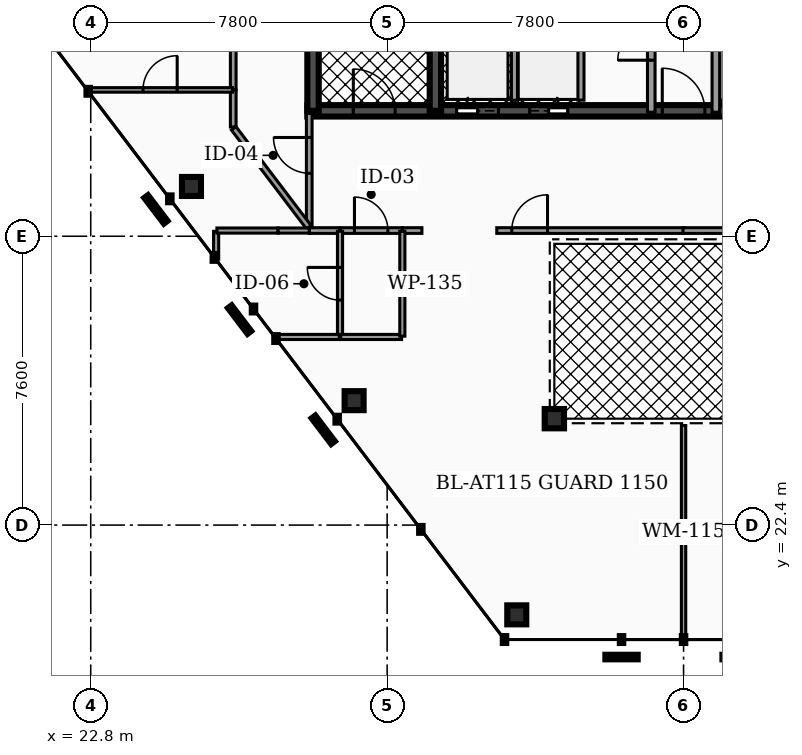
"""IFC4 building model, lengths in metres.
Left out: names, types, materials, properties, quantities, classifications, styles, units other than length and angle.
Written with IfcOpenShell. Run it as: python <this file> out.ifc"""

import sys

from ifc_helpers import new_model, si_unit, direction, frame, frame_2d, origin, origin_2d, place, context, subcontext, project, spatial, rectangle, hollow_rectangle, hollow_circle, extrude, element, fill, save


model = new_model("IFC4")
c1 = context("Model", 3, precision=1e-05, world=origin(), true_north=direction((0.0, 1.0)))
c2 = subcontext(c1, "Body", "Model", "MODEL_VIEW")
j1 = project(units=[si_unit("LENGTHUNIT", "METRE"), si_unit("PLANEANGLEUNIT", "RADIAN")], contexts=[c1])
p1 = place(None, origin())
s1 = spatial("IfcSite", under=j1, at=p1, CompositionType="ELEMENT")
p2 = place(p1, origin())
s2 = spatial("IfcBuilding", under=s1, at=p2, CompositionType="ELEMENT")
p3 = place(p2, frame((0.0, 0.0, 272.0)))
s3 = spatial("IfcBuildingStorey", under=s2, at=p3, CompositionType="ELEMENT", Elevation=272.0)
p4 = place(p3, frame((28.5, 33.3, 0.0), z_axis=(0.0, 0.0, 1.0), x_axis=(1.0, 0.0, 0.0)))
e1 = element("IfcWall", 1, at=p4, inside=s3, PredefinedType="SHEAR", context=c2, shape_type="SweptSolid", body=[
    extrude(rectangle(XDim=19.86, YDim=0.3, at=frame_2d((9.93, 0.0))), origin(), (0.0, 0.0, 1.0), 3.18),
])
p5 = place(p4, frame((3.93, 0.0, 0.0)))
e2 = element("IfcOpeningElement", 2, at=p5, cuts=e1, PredefinedType="OPENING", context=c2, shape_type="SweptSolid", body=[
    extrude(rectangle(XDim=1.1, YDim=2.15, at=frame_2d((0.55, 1.075))), frame((0.0, 0.16, 0.0), z_axis=(0.0, -1.0, 0.0), x_axis=(1.0, 0.0, 0.0)), (0.0, 0.0, 1.0), 0.32),
])
p6 = place(p4, frame((14.77, 0.0, 0.0)))
e3 = element("IfcOpeningElement", 3, at=p6, cuts=e1, PredefinedType="OPENING", context=c2, shape_type="SweptSolid", body=[
    extrude(rectangle(XDim=1.1, YDim=2.15, at=frame_2d((0.55, 1.075))), frame((0.0, 0.16, 0.0), z_axis=(0.0, -1.0, 0.0), x_axis=(1.0, 0.0, 0.0)), (0.0, 0.0, 1.0), 0.32),
])
p7 = place(p4, frame((11.25, 0.0, 0.0)))
e4 = element("IfcOpeningElement", 4, at=p7, cuts=e1, PredefinedType="OPENING", context=c2, shape_type="SweptSolid", body=[
    extrude(rectangle(XDim=1.0, YDim=2.1, at=frame_2d((0.5, 1.05))), frame((0.0, 0.16, 0.0), z_axis=(0.0, -1.0, 0.0), x_axis=(1.0, 0.0, 0.0)), (0.0, 0.0, 1.0), 0.32),
])
p8 = place(p4, frame((12.95, 0.0, 0.0)))
e5 = element("IfcOpeningElement", 5, at=p8, cuts=e1, PredefinedType="OPENING", context=c2, shape_type="SweptSolid", body=[
    extrude(rectangle(XDim=1.0, YDim=2.1, at=frame_2d((0.5, 1.05))), frame((0.0, 0.16, 0.0), z_axis=(0.0, -1.0, 0.0), x_axis=(1.0, 0.0, 0.0)), (0.0, 0.0, 1.0), 0.32),
])
p9 = place(p4, frame((5.85, 0.0, 0.0)))
e6 = element("IfcOpeningElement", 6, at=p9, cuts=e1, PredefinedType="OPENING", context=c2, shape_type="SweptSolid", body=[
    extrude(rectangle(XDim=1.0, YDim=2.1, at=frame_2d((0.5, 1.05))), frame((0.0, 0.16, 0.0), z_axis=(0.0, -1.0, 0.0), x_axis=(1.0, 0.0, 0.0)), (0.0, 0.0, 1.0), 0.32),
])
p10 = place(p4, frame((1.21, 0.0, 0.0)))
e7 = element("IfcOpeningElement", 7, at=p10, cuts=e1, PredefinedType="OPENING", context=c2, shape_type="SweptSolid", body=[
    extrude(rectangle(XDim=1.1, YDim=2.2, at=frame_2d((0.55, 1.1))), frame((0.0, 0.16, 0.0), z_axis=(0.0, -1.0, 0.0), x_axis=(1.0, 0.0, 0.0)), (0.0, 0.0, 1.0), 0.32),
])
p11 = place(p4, frame((9.34, 0.0, 0.0)))
e8 = element("IfcOpeningElement", 8, at=p11, cuts=e1, PredefinedType="OPENING", context=c2, shape_type="SweptSolid", body=[
    extrude(rectangle(XDim=1.12, YDim=2.05, at=frame_2d((0.56, 1.025))), frame((0.0, 0.16, 0.0), z_axis=(0.0, -1.0, 0.0), x_axis=(1.0, 0.0, 0.0)), (0.0, 0.0, 1.0), 0.32),
])
p12 = place(p4, frame((17.55, 0.0, 0.0)))
e9 = element("IfcOpeningElement", 9, at=p12, cuts=e1, PredefinedType="OPENING", context=c2, shape_type="SweptSolid", body=[
    extrude(rectangle(XDim=1.1, YDim=2.2, at=frame_2d((0.55, 1.1))), frame((0.0, 0.16, 0.0), z_axis=(0.0, -1.0, 0.0), x_axis=(1.0, 0.0, 0.0)), (0.0, 0.0, 1.0), 0.32),
])
for number, where, z_axis, x_axis in (
    (10, (28.65, 33.3, 0.0), (0.0, 0.0, 1.0), (0.0, 1.0, 0.0)),
    (11, (31.87, 33.3, 0.0), (0.0, 0.0, 1.0), (0.0, 1.0, 0.0)),
):
    element("IfcWall", number, at=place(p3, frame(where, z_axis=z_axis, x_axis=x_axis)), inside=s3, PredefinedType="SHEAR", context=c2, shape_type="SweptSolid", body=[
        extrude(rectangle(XDim=10.1, YDim=0.3, at=frame_2d((5.05, 0.0))), origin(), (0.0, 0.0, 1.0), 3.18),
    ])
for number, where, z_axis, x_axis in (
    (12, (25.451, 31.31, 0.0), (0.0, 0.0, 1.0), (1.0, 0.0, 0.0)),
    (13, (29.731, 25.674, 0.0), (0.0, 0.0, 1.0), (1.0, 0.0, 0.0)),
    (14, (34.011, 20.038, 0.0), (0.0, 0.0, 1.0), (1.0, 0.0, 0.0)),
):
    element("IfcColumn", number, at=place(p3, frame(where, z_axis=z_axis, x_axis=x_axis)), inside=s3, PredefinedType="COLUMN", context=c2, shape_type="SweptSolid", body=[
        extrude(hollow_rectangle(XDim=0.5, YDim=0.5, WallThickness=0.025, at=origin_2d()), origin(), (0.0, 0.0, 1.0), 3.18),
    ])
p13 = place(p3, frame((35.0, 25.2, 0.0), z_axis=(0.0, 0.0, 1.0), x_axis=(1.0, 0.0, 0.0)))
e15 = element("IfcColumn", 15, at=p13, inside=s3, PredefinedType="COLUMN", context=c2, shape_type="SweptSolid", body=[
    extrude(hollow_circle(Radius=0.254, WallThickness=0.02, at=origin_2d()), origin(), (0.0, 0.0, 1.0), 3.18),
])
p14 = place(p3, frame((33.95, 33.58, 0.0), z_axis=(0.0, 0.0, 1.0), x_axis=(0.0, 1.0, 0.0)))
e16 = element("IfcWall", 16, at=p14, inside=s3, PredefinedType="SOLIDWALL", context=c2, shape_type="SweptSolid", body=[
    extrude(rectangle(XDim=2.45, YDim=0.16, at=frame_2d((1.225, 0.0))), origin(), (0.0, 0.0, 1.0), 3.18),
])
for number, where, z_axis, x_axis in (
    (17, (39.4, 33.58, 0.0), (0.0, 0.0, 1.0), (0.0, 1.0, 0.0)),
    (18, (35.7, 33.58, 0.0), (0.0, 0.0, 1.0), (0.0, 1.0, 0.0)),
):
    element("IfcWall", number, at=place(p3, frame(where, z_axis=z_axis, x_axis=x_axis)), inside=s3, PredefinedType="SOLIDWALL", context=c2, shape_type="SweptSolid", body=[
        extrude(rectangle(XDim=2.25, YDim=0.16, at=frame_2d((1.125, 0.0))), origin(), (0.0, 0.0, 1.0), 3.18),
    ])
p15 = place(p3, frame((37.55, 33.265, 0.0), z_axis=(0.0, 0.0, 1.0), x_axis=(0.0, 1.0, 0.0)))
e19 = element("IfcWall", 19, at=p15, inside=s3, PredefinedType="PARTITIONING", context=c2, shape_type="SweptSolid", body=[
    extrude(rectangle(XDim=3.615, YDim=0.2, at=frame_2d((1.808, 0.0))), origin(), (0.0, 0.0, 1.0), 2.235),
])
p16 = place(p15, frame((1.367, 0.0, 0.0)))
e20 = element("IfcOpeningElement", 20, at=p16, cuts=e19, PredefinedType="OPENING", context=c2, shape_type="SweptSolid", body=[
    extrude(rectangle(XDim=0.88, YDim=2.05, at=frame_2d((0.44, 1.025))), frame((0.0, 0.11, 0.0), z_axis=(0.0, -1.0, 0.0), x_axis=(1.0, 0.0, 0.0)), (0.0, 0.0, 1.0), 0.22),
])
p17 = place(p3, frame((39.25, 33.265, 0.0), z_axis=(0.0, 0.0, 1.0), x_axis=(0.0, 1.0, 0.0)))
e21 = element("IfcWall", 21, at=p17, inside=s3, PredefinedType="PARTITIONING", context=c2, shape_type="SweptSolid", body=[
    extrude(rectangle(XDim=3.615, YDim=0.2, at=frame_2d((1.808, 0.0))), origin(), (0.0, 0.0, 1.0), 2.235),
])
p18 = place(p3, frame((28.55, 30.227, 0.0), z_axis=(0.0, 0.0, 1.0), x_axis=(0.0, 1.0, 0.0)))
e22 = element("IfcWall", 22, at=p18, inside=s3, PredefinedType="PARTITIONING", context=c2, shape_type="SweptSolid", body=[
    extrude(rectangle(XDim=3.003, YDim=0.15, at=frame_2d((1.501, 0.0))), origin(), (0.0, 0.0, 1.0), 2.235),
])
p19 = place(p18, frame((1.431, 0.0, 0.0)))
e23 = element("IfcOpeningElement", 23, at=p19, cuts=e22, PredefinedType="OPENING", context=c2, shape_type="SweptSolid", body=[
    extrude(rectangle(XDim=0.94, YDim=2.05, at=frame_2d((0.47, 1.025))), frame((0.0, 0.085, 0.0), z_axis=(0.0, -1.0, 0.0), x_axis=(1.0, 0.0, 0.0)), (0.0, 0.0, 1.0), 0.17),
])
p20 = place(p3, frame((29.365, 30.15, 0.0), z_axis=(0.0, 0.0, 1.0), x_axis=(1.0, 0.0, 0.0)))
e24 = element("IfcWall", 24, at=p20, inside=s3, PredefinedType="PARTITIONING", context=c2, shape_type="SweptSolid", body=[
    extrude(rectangle(XDim=1.63, YDim=0.15, at=frame_2d((0.815, 0.0))), origin(), (0.0, 0.0, 1.0), 2.235),
])
p21 = place(p20, frame((0.375, 0.0, 0.0)))
e25 = element("IfcOpeningElement", 25, at=p21, cuts=e24, PredefinedType="OPENING", context=c2, shape_type="SweptSolid", body=[
    extrude(rectangle(XDim=0.88, YDim=2.05, at=frame_2d((0.44, 1.025))), frame((0.0, 0.085, 0.0), z_axis=(0.0, -1.0, 0.0), x_axis=(1.0, 0.0, 0.0)), (0.0, 0.0, 1.0), 0.17),
])
p22 = place(p3, frame((28.55, 30.15, 0.0), z_axis=(0.0, 0.0, 1.0), x_axis=(1.0, 0.0, 0.0)))
e26 = element("IfcWall", 26, at=p22, inside=s3, PredefinedType="PARTITIONING", context=c2, shape_type="SweptSolid", body=[
    extrude(rectangle(XDim=0.805, YDim=0.15, at=frame_2d((0.402, 0.0))), origin(), (0.0, 0.0, 1.0), 2.235),
])
p23 = place(p3, frame((33.485, 30.15, 0.0), z_axis=(0.0, 0.0, 1.0), x_axis=(1.0, 0.0, 0.0)))
e27 = element("IfcWall", 27, at=p23, inside=s3, PredefinedType="PARTITIONING", context=c2, shape_type="SweptSolid", body=[
    extrude(rectangle(XDim=4.93, YDim=0.15, at=frame_2d((2.465, 0.0))), origin(), (0.0, 0.0, 1.0), 2.235),
])
p24 = place(p23, frame((0.395, 0.0, 0.0)))
e28 = element("IfcOpeningElement", 28, at=p24, cuts=e27, PredefinedType="OPENING", context=c2, shape_type="SweptSolid", body=[
    extrude(rectangle(XDim=0.94, YDim=2.05, at=frame_2d((0.47, 1.025))), frame((0.0, 0.085, 0.0), z_axis=(0.0, -1.0, 0.0), x_axis=(1.0, 0.0, 0.0)), (0.0, 0.0, 1.0), 0.17),
])
p25 = place(p3, frame((31.005, 30.15, 0.0), z_axis=(0.0, 0.0, 1.0), x_axis=(1.0, 0.0, 0.0)))
e29 = element("IfcWall", 29, at=p25, inside=s3, PredefinedType="PARTITIONING", context=c2, shape_type="SweptSolid", body=[
    extrude(rectangle(XDim=0.51, YDim=0.15, at=frame_2d((0.255, 0.0))), origin(), (0.0, 0.0, 1.0), 2.235),
])
p26 = place(p3, frame((38.385, 30.15, 0.0), z_axis=(0.0, 0.0, 1.0), x_axis=(1.0, 0.0, 0.0)))
e30 = element("IfcWall", 30, at=p26, inside=s3, PredefinedType="PARTITIONING", context=c2, shape_type="SweptSolid", body=[
    extrude(rectangle(XDim=4.93, YDim=0.15, at=frame_2d((2.465, 0.0))), origin(), (0.0, 0.0, 1.0), 2.235),
])
p27 = place(p26, frame((3.595, 0.0, 0.0)))
e31 = element("IfcOpeningElement", 31, at=p27, cuts=e30, PredefinedType="OPENING", context=c2, shape_type="SweptSolid", body=[
    extrude(rectangle(XDim=0.94, YDim=2.05, at=frame_2d((0.47, 1.025))), frame((0.0, 0.085, 0.0), z_axis=(0.0, -1.0, 0.0), x_axis=(1.0, 0.0, 0.0)), (0.0, 0.0, 1.0), 0.17),
])
p28 = place(p3, frame((26.55, 33.855, 0.0), z_axis=(0.0, 0.0, 1.0), x_axis=(0.0, 1.0, 0.0)))
e32 = element("IfcWall", 32, at=p28, inside=s3, PredefinedType="PARTITIONING", context=c2, shape_type="SweptSolid", body=[
    extrude(rectangle(XDim=9.695, YDim=0.15, at=frame_2d((4.847, 0.0))), origin(), (0.0, 0.0, 1.0), 2.235),
])
p29 = place(p28, frame((4.377, 0.0, 0.0)))
e33 = element("IfcOpeningElement", 33, at=p29, cuts=e32, PredefinedType="OPENING", context=c2, shape_type="SweptSolid", body=[
    extrude(rectangle(XDim=0.94, YDim=2.05, at=frame_2d((0.47, 1.025))), frame((0.0, 0.085, 0.0), z_axis=(0.0, -1.0, 0.0), x_axis=(1.0, 0.0, 0.0)), (0.0, 0.0, 1.0), 0.17),
])
p30 = place(p3, frame((26.562, 32.84, 0.0), z_axis=(0.0, 0.0, 1.0), x_axis=(0.604783852999, -0.796389660375, 0.0)))
e34 = element("IfcWall", 34, at=p30, inside=s3, PredefinedType="PARTITIONING", context=c2, shape_type="SweptSolid", body=[
    extrude(rectangle(XDim=3.267, YDim=0.15, at=frame_2d((1.634, 0.0))), origin(), (0.0, 0.0, 1.0), 2.235),
])
p31 = place(p3, frame((26.55, 32.875, 0.0), z_axis=(0.0, 0.0, 1.0), x_axis=(0.0, 1.0, 0.0)))
e35 = element("IfcWall", 35, at=p31, inside=s3, PredefinedType="PARTITIONING", context=c2, shape_type="SweptSolid", body=[
    extrude(rectangle(XDim=0.97, YDim=0.15, at=frame_2d((0.485, 0.0))), origin(), (0.0, 0.0, 1.0), 2.235),
])
p32 = place(p3, frame((29.36, 27.37, 0.0), z_axis=(0.0, 0.0, 1.0), x_axis=(0.0, 1.0, 0.0)))
e36 = element("IfcWall", 36, at=p32, inside=s3, PredefinedType="PARTITIONING", context=c2, shape_type="SweptSolid", body=[
    extrude(rectangle(XDim=2.76, YDim=0.135, at=frame_2d((1.38, 0.0))), origin(), (0.0, 0.0, 1.0), 2.235),
])
p33 = place(p32, frame((0.95, 0.0, 0.0)))
e37 = element("IfcOpeningElement", 37, at=p33, cuts=e36, PredefinedType="OPENING", context=c2, shape_type="SweptSolid", body=[
    extrude(rectangle(XDim=0.86, YDim=2.05, at=frame_2d((0.43, 1.025))), frame((0.0, 0.077, 0.0), z_axis=(0.0, -1.0, 0.0), x_axis=(1.0, 0.0, 0.0)), (0.0, 0.0, 1.0), 0.155),
])
p34 = place(p3, frame((29.38, 27.35, 0.0), z_axis=(0.0, 0.0, 1.0), x_axis=(1.0, 0.0, 0.0)))
e38 = element("IfcWall", 38, at=p34, inside=s3, PredefinedType="PARTITIONING", context=c2, shape_type="SweptSolid", body=[
    extrude(rectangle(XDim=1.6, YDim=0.135, at=frame_2d((0.8, 0.0))), origin(), (0.0, 0.0, 1.0), 2.235),
])
p35 = place(p3, frame((31.0, 27.37, 0.0), z_axis=(0.0, 0.0, 1.0), x_axis=(0.0, 1.0, 0.0)))
e39 = element("IfcWall", 39, at=p35, inside=s3, PredefinedType="PARTITIONING", context=c2, shape_type="SweptSolid", body=[
    extrude(rectangle(XDim=2.76, YDim=0.135, at=frame_2d((1.38, 0.0))), origin(), (0.0, 0.0, 1.0), 2.235),
])
p36 = place(p3, frame((27.657, 27.35, 0.0), z_axis=(0.0, 0.0, 1.0), x_axis=(1.0, 0.0, 0.0)))
e40 = element("IfcWall", 40, at=p36, inside=s3, PredefinedType="PARTITIONING", context=c2, shape_type="SweptSolid", body=[
    extrude(rectangle(XDim=1.683, YDim=0.135, at=frame_2d((0.842, 0.0))), origin(), (0.0, 0.0, 1.0), 2.235),
])
p37 = place(p3, frame((26.1, 29.396, 0.0), z_axis=(0.0, 0.0, 1.0), x_axis=(0.0, 1.0, 0.0)))
e41 = element("IfcWall", 41, at=p37, inside=s3, PredefinedType="PARTITIONING", context=c2, shape_type="SweptSolid", body=[
    extrude(rectangle(XDim=0.734, YDim=0.135, at=frame_2d((0.367, 0.0))), origin(), (0.0, 0.0, 1.0), 2.235),
])
p38 = place(p3, frame((26.12, 30.15, 0.0), z_axis=(0.0, 0.0, 1.0), x_axis=(1.0, 0.0, 0.0)))
e42 = element("IfcWall", 42, at=p38, inside=s3, PredefinedType="PARTITIONING", context=c2, shape_type="SweptSolid", body=[
    extrude(rectangle(XDim=1.61, YDim=0.135, at=frame_2d((0.805, 0.0))), origin(), (0.0, 0.0, 1.0), 2.235),
])
p39 = place(p3, frame((27.73, 30.15, 0.0), z_axis=(0.0, 0.0, 1.0), x_axis=(1.0, 0.0, 0.0)))
e43 = element("IfcWall", 43, at=p39, inside=s3, PredefinedType="PARTITIONING", context=c2, shape_type="SweptSolid", body=[
    extrude(rectangle(XDim=0.82, YDim=0.135, at=frame_2d((0.41, 0.0))), origin(), (0.0, 0.0, 1.0), 2.235),
])
p40 = place(p3, frame((38.4, 19.403, 0.0), z_axis=(0.0, 0.0, 1.0), x_axis=(0.0, 1.0, 0.0)))
e44 = element("IfcWall", 44, at=p40, inside=s3, PredefinedType="MOVABLE", context=c2, shape_type="SweptSolid", body=[
    extrude(rectangle(XDim=5.617, YDim=0.115, at=frame_2d((2.809, 0.0))), origin(), (0.0, 0.0, 1.0), 2.235),
])
p41 = place(p3, frame((22.721, 33.85, 0.0), z_axis=(0.0, 0.0, 1.0), x_axis=(1.0, 0.0, 0.0)))
e45 = element("IfcWall", 45, at=p41, inside=s3, PredefinedType="PARTITIONING", context=c2, shape_type="SweptSolid", body=[
    extrude(rectangle(XDim=3.809, YDim=0.12, at=frame_2d((1.905, 0.0))), origin(), (0.0, 0.0, 1.0), 2.235),
])
p42 = place(p41, frame((1.455, 0.0, 0.0)))
e46 = element("IfcOpeningElement", 46, at=p42, cuts=e45, PredefinedType="OPENING", context=c2, shape_type="SweptSolid", body=[
    extrude(rectangle(XDim=0.9, YDim=2.05, at=frame_2d((0.45, 1.025))), frame((0.0, 0.07, 0.0), z_axis=(0.0, -1.0, 0.0), x_axis=(1.0, 0.0, 0.0)), (0.0, 0.0, 1.0), 0.14),
])
p43 = place(p5, origin())
e47 = element("IfcDoor", 47, at=p43, inside=s3, OperationType="SLIDING_TO_LEFT", PredefinedType="DOOR", context=c2, shape_type="SweptSolid", body=[
    extrude(rectangle(XDim=1.1, YDim=2.15, at=frame_2d((0.55, 1.075))), frame((0.0, 0.025, 0.0), z_axis=(0.0, -1.0, 0.0), x_axis=(1.0, 0.0, 0.0)), (0.0, 0.0, 1.0), 0.05),
])
fill(e2, e47)
p44 = place(p9, origin())
e48 = element("IfcDoor", 48, at=p44, inside=s3, OperationType="SLIDING_TO_RIGHT", PredefinedType="DOOR", context=c2, shape_type="SweptSolid", body=[
    extrude(rectangle(XDim=1.0, YDim=2.1, at=frame_2d((0.5, 1.05))), frame((0.0, 0.025, 0.0), z_axis=(0.0, -1.0, 0.0), x_axis=(1.0, 0.0, 0.0)), (0.0, 0.0, 1.0), 0.05),
])
fill(e6, e48)
p45 = place(p10, origin())
e49 = element("IfcDoor", 49, at=p45, inside=s3, OperationType="SINGLE_SWING_LEFT", PredefinedType="DOOR", context=c2, shape_type="SweptSolid", body=[
    extrude(rectangle(XDim=1.1, YDim=2.2, at=frame_2d((0.55, 1.1))), frame((0.0, 0.025, 0.0), z_axis=(0.0, -1.0, 0.0), x_axis=(1.0, 0.0, 0.0)), (0.0, 0.0, 1.0), 0.05),
])
fill(e7, e49)
p46 = place(p11, origin())
e50 = element("IfcDoor", 50, at=p46, inside=s3, OperationType="SINGLE_SWING_LEFT", PredefinedType="DOOR", context=c2, shape_type="SweptSolid", body=[
    extrude(rectangle(XDim=1.12, YDim=2.05, at=frame_2d((0.56, 1.025))), frame((0.0, 0.025, 0.0), z_axis=(0.0, -1.0, 0.0), x_axis=(1.0, 0.0, 0.0)), (0.0, 0.0, 1.0), 0.05),
])
fill(e8, e50)
p47 = place(p16, origin())
e51 = element("IfcDoor", 51, at=p47, inside=s3, OperationType="SINGLE_SWING_LEFT", PredefinedType="DOOR", context=c2, shape_type="SweptSolid", body=[
    extrude(rectangle(XDim=0.88, YDim=2.05, at=frame_2d((0.44, 1.025))), frame((0.0, 0.025, 0.0), z_axis=(0.0, -1.0, 0.0), x_axis=(1.0, 0.0, 0.0)), (0.0, 0.0, 1.0), 0.05),
])
fill(e20, e51)
p48 = place(p19, origin())
e52 = element("IfcDoor", 52, at=p48, inside=s3, OperationType="SINGLE_SWING_RIGHT", PredefinedType="DOOR", context=c2, shape_type="SweptSolid", body=[
    extrude(rectangle(XDim=0.94, YDim=2.05, at=frame_2d((0.47, 1.025))), frame((0.0, 0.025, 0.0), z_axis=(0.0, -1.0, 0.0), x_axis=(1.0, 0.0, 0.0)), (0.0, 0.0, 1.0), 0.05),
])
fill(e23, e52)
p49 = place(p21, origin())
e53 = element("IfcDoor", 53, at=p49, inside=s3, OperationType="SINGLE_SWING_LEFT", PredefinedType="DOOR", context=c2, shape_type="SweptSolid", body=[
    extrude(rectangle(XDim=0.88, YDim=2.05, at=frame_2d((0.44, 1.025))), frame((0.0, 0.025, 0.0), z_axis=(0.0, -1.0, 0.0), x_axis=(1.0, 0.0, 0.0)), (0.0, 0.0, 1.0), 0.05),
])
fill(e25, e53)
p50 = place(p24, origin())
e54 = element("IfcDoor", 54, at=p50, inside=s3, OperationType="SINGLE_SWING_RIGHT", PredefinedType="DOOR", context=c2, shape_type="SweptSolid", body=[
    extrude(rectangle(XDim=0.94, YDim=2.05, at=frame_2d((0.47, 1.025))), frame((0.0, 0.025, 0.0), z_axis=(0.0, -1.0, 0.0), x_axis=(1.0, 0.0, 0.0)), (0.0, 0.0, 1.0), 0.05),
])
fill(e28, e54)
p51 = place(p33, origin())
e55 = element("IfcDoor", 55, at=p51, inside=s3, OperationType="SINGLE_SWING_RIGHT", PredefinedType="DOOR", context=c2, shape_type="SweptSolid", body=[
    extrude(rectangle(XDim=0.86, YDim=2.05, at=frame_2d((0.43, 1.025))), frame((0.0, 0.025, 0.0), z_axis=(0.0, -1.0, 0.0), x_axis=(1.0, 0.0, 0.0)), (0.0, 0.0, 1.0), 0.05),
])
fill(e37, e55)
p52 = place(p42, origin())
e56 = element("IfcDoor", 56, at=p52, inside=s3, OperationType="SINGLE_SWING_RIGHT", PredefinedType="DOOR", context=c2, shape_type="SweptSolid", body=[
    extrude(rectangle(XDim=0.9, YDim=2.05, at=frame_2d((0.45, 1.025))), frame((0.0, 0.025, 0.0), z_axis=(0.0, -1.0, 0.0), x_axis=(1.0, 0.0, 0.0)), (0.0, 0.0, 1.0), 0.05),
])
fill(e46, e56)
save(model, sys.argv[1])
